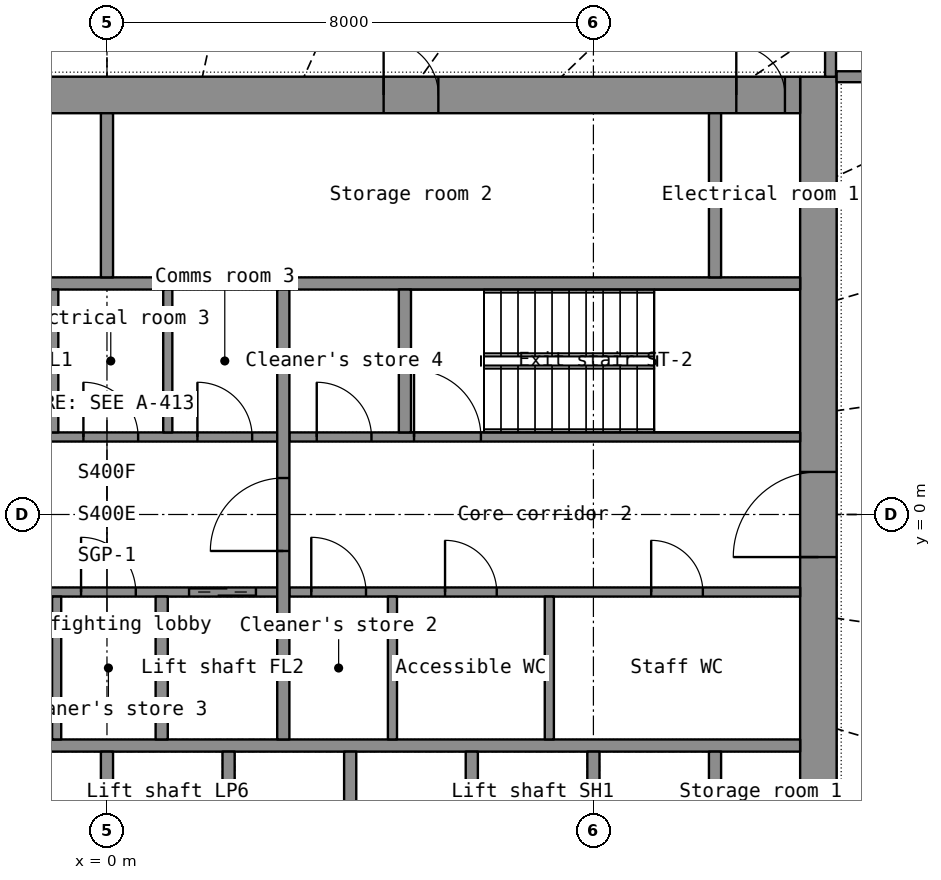
"""IFC4 building model, lengths in metres.
Left out: names, types, materials, properties, quantities, classifications, styles, units other than length and angle.
Written with IfcOpenShell. Run it as: python <this file> out.ifc"""

import sys

from ifc_helpers import new_model, si_unit, direction, frame, frame_2d, origin, place, context, subcontext, project, spatial, rectangle, extrude, element, fill, save


model = new_model("IFC4")
c1 = context("Model", 3, precision=1e-05, world=origin(), true_north=direction((0.0, 1.0)))
c2 = subcontext(c1, "Body", "Model", "MODEL_VIEW")
j1 = project(units=[si_unit("LENGTHUNIT", "METRE"), si_unit("PLANEANGLEUNIT", "RADIAN")], contexts=[c1])
p1 = place(None, origin())
s1 = spatial("IfcSite", under=j1, at=p1, CompositionType="ELEMENT")
p2 = place(p1, origin())
s2 = spatial("IfcBuilding", under=s1, at=p2, CompositionType="ELEMENT")
p3 = place(p2, frame((0.0, 0.0, 85.2)))
s3 = spatial("IfcBuildingStorey", under=s2, at=p3, CompositionType="ELEMENT", Elevation=85.2)
p4 = place(p3, frame((11.7, -7.2, 0.0), z_axis=(0.0, 0.0, 1.0), x_axis=(0.0, 1.0, 0.0)))
e1 = element("IfcWall", 1, at=p4, inside=s3, PredefinedType="SHEAR", context=c2, shape_type="SweptSolid", body=[
    extrude(rectangle(XDim=14.4, YDim=0.6, at=frame_2d((7.2, 0.0))), origin(), (0.0, 0.0, 1.0), 7.0),
])
p5 = place(p4, frame((6.5, 0.0, 0.0)))
e2 = element("IfcOpeningElement", 2, at=p5, cuts=e1, PredefinedType="OPENING", context=c2, shape_type="SweptSolid", body=[
    extrude(rectangle(XDim=1.4, YDim=2.2, at=frame_2d((0.7, 1.1))), frame((0.0, 0.31, 0.0), z_axis=(0.0, -1.0, 0.0), x_axis=(1.0, 0.0, 0.0)), (0.0, 0.0, 1.0), 0.62),
])
p6 = place(p3, frame((-11.4, 6.9, 0.0), z_axis=(0.0, 0.0, 1.0), x_axis=(1.0, 0.0, 0.0)))
e3 = element("IfcWall", 3, at=p6, inside=s3, PredefinedType="SHEAR", context=c2, shape_type="SweptSolid", body=[
    extrude(rectangle(XDim=22.8, YDim=0.6, at=frame_2d((11.4, 0.0))), origin(), (0.0, 0.0, 1.0), 7.0),
])
p7 = place(p6, frame((1.85, 0.0, 0.0)))
e4 = element("IfcOpeningElement", 4, at=p7, cuts=e3, PredefinedType="OPENING", context=c2, shape_type="SweptSolid", body=[
    extrude(rectangle(XDim=1.1, YDim=2.2, at=frame_2d((0.55, 1.1))), frame((0.0, 0.31, 0.0), z_axis=(0.0, -1.0, 0.0), x_axis=(1.0, 0.0, 0.0)), (0.0, 0.0, 1.0), 0.62),
])
p8 = place(p6, frame((7.95, 0.0, 0.0)))
e5 = element("IfcOpeningElement", 5, at=p8, cuts=e3, PredefinedType="OPENING", context=c2, shape_type="SweptSolid", body=[
    extrude(rectangle(XDim=0.9, YDim=2.1, at=frame_2d((0.45, 1.05))), frame((0.0, 0.31, 0.0), z_axis=(0.0, -1.0, 0.0), x_axis=(1.0, 0.0, 0.0)), (0.0, 0.0, 1.0), 0.62),
])
p9 = place(p6, frame((15.95, 0.0, 0.0)))
e6 = element("IfcOpeningElement", 6, at=p9, cuts=e3, PredefinedType="OPENING", context=c2, shape_type="SweptSolid", body=[
    extrude(rectangle(XDim=0.9, YDim=2.1, at=frame_2d((0.45, 1.05))), frame((0.0, 0.31, 0.0), z_axis=(0.0, -1.0, 0.0), x_axis=(1.0, 0.0, 0.0)), (0.0, 0.0, 1.0), 0.62),
])
p10 = place(p6, frame((0.25, 0.0, 0.0)))
e7 = element("IfcOpeningElement", 7, at=p10, cuts=e3, PredefinedType="OPENING", context=c2, shape_type="SweptSolid", body=[
    extrude(rectangle(XDim=0.8, YDim=2.05, at=frame_2d((0.4, 1.025))), frame((0.0, 0.31, 0.0), z_axis=(0.0, -1.0, 0.0), x_axis=(1.0, 0.0, 0.0)), (0.0, 0.0, 1.0), 0.62),
])
p11 = place(p6, frame((21.75, 0.0, 0.0)))
e8 = element("IfcOpeningElement", 8, at=p11, cuts=e3, PredefinedType="OPENING", context=c2, shape_type="SweptSolid", body=[
    extrude(rectangle(XDim=0.8, YDim=2.05, at=frame_2d((0.4, 1.025))), frame((0.0, 0.31, 0.0), z_axis=(0.0, -1.0, 0.0), x_axis=(1.0, 0.0, 0.0)), (0.0, 0.0, 1.0), 0.62),
])
for number, where, z_axis, x_axis in (
    (9, (-11.4, -3.8, 0.0), (0.0, 0.0, 1.0), (1.0, 0.0, 0.0)),
    (10, (-11.4, 3.8, 0.0), (0.0, 0.0, 1.0), (1.0, 0.0, 0.0)),
):
    element("IfcWall", number, at=place(p3, frame(where, z_axis=z_axis, x_axis=x_axis)), inside=s3, PredefinedType="SHEAR", context=c2, shape_type="SweptSolid", body=[
        extrude(rectangle(XDim=22.8, YDim=0.2, at=frame_2d((11.4, 0.0))), origin(), (0.0, 0.0, 1.0), 7.0),
    ])
for number, where, z_axis, x_axis in (
    (11, (0.0, -6.6, 0.0), (0.0, 0.0, 1.0), (0.0, 1.0, 0.0)),
    (12, (2.0, -6.6, 0.0), (0.0, 0.0, 1.0), (0.0, 1.0, 0.0)),
    (13, (4.0, -6.6, 0.0), (0.0, 0.0, 1.0), (0.0, 1.0, 0.0)),
    (14, (6.0, -6.6, 0.0), (0.0, 0.0, 1.0), (0.0, 1.0, 0.0)),
    (15, (8.0, -6.6, 0.0), (0.0, 0.0, 1.0), (0.0, 1.0, 0.0)),
    (16, (10.0, -6.6, 0.0), (0.0, 0.0, 1.0), (0.0, 1.0, 0.0)),
    (17, (10.0, 3.9, 0.0), (0.0, 0.0, 1.0), (0.0, 1.0, 0.0)),
):
    element("IfcWall", number, at=place(p3, frame(where, z_axis=z_axis, x_axis=x_axis)), inside=s3, PredefinedType="SHEAR", context=c2, shape_type="SweptSolid", body=[
        extrude(rectangle(XDim=2.7, YDim=0.2, at=frame_2d((1.35, 0.0))), origin(), (0.0, 0.0, 1.0), 7.0),
    ])
p12 = place(p3, frame((0.0, 3.9, 0.0), z_axis=(0.0, 0.0, 1.0), x_axis=(0.0, 1.0, 0.0)))
e18 = element("IfcWall", 18, at=p12, inside=s3, PredefinedType="PARTITIONING", context=c2, shape_type="SweptSolid", body=[
    extrude(rectangle(XDim=2.7, YDim=0.2, at=frame_2d((1.35, 0.0))), origin(), (0.0, 0.0, 1.0), 7.0),
])
p13 = place(p3, frame((-2.8, -1.275, 0.0), z_axis=(0.0, 0.0, 1.0), x_axis=(1.0, 0.0, 0.0)))
e19 = element("IfcWall", 19, at=p13, inside=s3, PredefinedType="SHEAR", context=c2, shape_type="SweptSolid", body=[
    extrude(rectangle(XDim=5.6, YDim=0.15, at=frame_2d((2.8, 0.0))), origin(), (0.0, 0.0, 1.0), 7.0),
])
p14 = place(p13, frame((4.15, 0.0, 0.0)))
e20 = element("IfcOpeningElement", 20, at=p14, cuts=e19, PredefinedType="OPENING", context=c2, shape_type="SweptSolid", body=[
    extrude(rectangle(XDim=1.1, YDim=2.2, at=frame_2d((0.55, 1.1))), frame((0.0, 0.085, 0.0), z_axis=(0.0, -1.0, 0.0), x_axis=(1.0, 0.0, 0.0)), (0.0, 0.0, 1.0), 0.17),
])
p15 = place(p13, frame((0.499, 0.0, 0.0)))
e21 = element("IfcOpeningElement", 21, at=p15, cuts=e19, PredefinedType="OPENING", context=c2, shape_type="SweptSolid", body=[
    extrude(rectangle(XDim=0.9, YDim=2.1, at=frame_2d((0.45, 1.05))), frame((0.0, 0.085, 0.0), z_axis=(0.0, -1.0, 0.0), x_axis=(1.0, 0.0, 0.0)), (0.0, 0.0, 1.0), 0.17),
])
p16 = place(p13, frame((2.374, 0.0, 0.0)))
e22 = element("IfcOpeningElement", 22, at=p16, cuts=e19, PredefinedType="OPENING", context=c2, shape_type="SweptSolid", body=[
    extrude(rectangle(XDim=0.9, YDim=2.1, at=frame_2d((0.45, 1.05))), frame((0.0, 0.085, 0.0), z_axis=(0.0, -1.0, 0.0), x_axis=(1.0, 0.0, 0.0)), (0.0, 0.0, 1.0), 0.17),
])
p17 = place(p3, frame((3.0, -1.275, 0.0), z_axis=(0.0, 0.0, 1.0), x_axis=(1.0, 0.0, 0.0)))
e23 = element("IfcWall", 23, at=p17, inside=s3, PredefinedType="PARTITIONING", context=c2, shape_type="SweptSolid", body=[
    extrude(rectangle(XDim=8.4, YDim=0.15, at=frame_2d((4.2, 0.0))), origin(), (0.0, 0.0, 1.0), 7.0),
])
p18 = place(p17, frame((0.36, 0.0, 0.0)))
e24 = element("IfcOpeningElement", 24, at=p18, cuts=e23, PredefinedType="OPENING", context=c2, shape_type="SweptSolid", body=[
    extrude(rectangle(XDim=0.9, YDim=2.1, at=frame_2d((0.45, 1.05))), frame((0.0, 0.085, 0.0), z_axis=(0.0, -1.0, 0.0), x_axis=(1.0, 0.0, 0.0)), (0.0, 0.0, 1.0), 0.17),
])
p19 = place(p17, frame((2.56, 0.0, 0.0)))
e25 = element("IfcOpeningElement", 25, at=p19, cuts=e23, PredefinedType="OPENING", context=c2, shape_type="SweptSolid", body=[
    extrude(rectangle(XDim=0.85, YDim=2.1, at=frame_2d((0.425, 1.05))), frame((0.0, 0.085, 0.0), z_axis=(0.0, -1.0, 0.0), x_axis=(1.0, 0.0, 0.0)), (0.0, 0.0, 1.0), 0.17),
])
p20 = place(p17, frame((5.95, 0.0, 0.0)))
e26 = element("IfcOpeningElement", 26, at=p20, cuts=e23, PredefinedType="OPENING", context=c2, shape_type="SweptSolid", body=[
    extrude(rectangle(XDim=0.85, YDim=2.1, at=frame_2d((0.425, 1.05))), frame((0.0, 0.085, 0.0), z_axis=(0.0, -1.0, 0.0), x_axis=(1.0, 0.0, 0.0)), (0.0, 0.0, 1.0), 0.17),
])
p21 = place(p3, frame((-2.8, 1.275, 0.0), z_axis=(0.0, 0.0, 1.0), x_axis=(1.0, 0.0, 0.0)))
e27 = element("IfcWall", 27, at=p21, inside=s3, PredefinedType="SHEAR", context=c2, shape_type="SweptSolid", body=[
    extrude(rectangle(XDim=5.6, YDim=0.15, at=frame_2d((2.8, 0.0))), origin(), (0.0, 0.0, 1.0), 7.0),
])
p22 = place(p21, frame((0.35, 0.0, 0.0)))
e28 = element("IfcOpeningElement", 28, at=p22, cuts=e27, PredefinedType="OPENING", context=c2, shape_type="SweptSolid", body=[
    extrude(rectangle(XDim=1.1, YDim=2.2, at=frame_2d((0.55, 1.1))), frame((0.0, 0.085, 0.0), z_axis=(0.0, -1.0, 0.0), x_axis=(1.0, 0.0, 0.0)), (0.0, 0.0, 1.0), 0.17),
])
p23 = place(p21, frame((2.413, 0.0, 0.0)))
e29 = element("IfcOpeningElement", 29, at=p23, cuts=e27, PredefinedType="OPENING", context=c2, shape_type="SweptSolid", body=[
    extrude(rectangle(XDim=0.9, YDim=2.1, at=frame_2d((0.45, 1.05))), frame((0.0, 0.085, 0.0), z_axis=(0.0, -1.0, 0.0), x_axis=(1.0, 0.0, 0.0)), (0.0, 0.0, 1.0), 0.17),
])
p24 = place(p21, frame((4.288, 0.0, 0.0)))
e30 = element("IfcOpeningElement", 30, at=p24, cuts=e27, PredefinedType="OPENING", context=c2, shape_type="SweptSolid", body=[
    extrude(rectangle(XDim=0.9, YDim=2.1, at=frame_2d((0.45, 1.05))), frame((0.0, 0.085, 0.0), z_axis=(0.0, -1.0, 0.0), x_axis=(1.0, 0.0, 0.0)), (0.0, 0.0, 1.0), 0.17),
])
p25 = place(p3, frame((3.0, 1.275, 0.0), z_axis=(0.0, 0.0, 1.0), x_axis=(1.0, 0.0, 0.0)))
e31 = element("IfcWall", 31, at=p25, inside=s3, PredefinedType="SHEAR", context=c2, shape_type="SweptSolid", body=[
    extrude(rectangle(XDim=8.4, YDim=0.15, at=frame_2d((4.2, 0.0))), origin(), (0.0, 0.0, 1.0), 7.0),
])
p26 = place(p25, frame((2.05, 0.0, 0.0)))
e32 = element("IfcOpeningElement", 32, at=p26, cuts=e31, PredefinedType="OPENING", context=c2, shape_type="SweptSolid", body=[
    extrude(rectangle(XDim=1.1, YDim=2.15, at=frame_2d((0.55, 1.075))), frame((0.0, 0.085, 0.0), z_axis=(0.0, -1.0, 0.0), x_axis=(1.0, 0.0, 0.0)), (0.0, 0.0, 1.0), 0.17),
])
p27 = place(p25, frame((0.45, 0.0, 0.0)))
e33 = element("IfcOpeningElement", 33, at=p27, cuts=e31, PredefinedType="OPENING", context=c2, shape_type="SweptSolid", body=[
    extrude(rectangle(XDim=0.9, YDim=2.1, at=frame_2d((0.45, 1.05))), frame((0.0, 0.085, 0.0), z_axis=(0.0, -1.0, 0.0), x_axis=(1.0, 0.0, 0.0)), (0.0, 0.0, 1.0), 0.17),
])
p28 = place(p3, frame((2.9, -3.7, 0.0), z_axis=(0.0, 0.0, 1.0), x_axis=(0.0, 1.0, 0.0)))
e34 = element("IfcWall", 34, at=p28, inside=s3, PredefinedType="SHEAR", context=c2, shape_type="SweptSolid", body=[
    extrude(rectangle(XDim=7.4, YDim=0.2, at=frame_2d((3.7, 0.0))), origin(), (0.0, 0.0, 1.0), 7.0),
])
p29 = place(p28, frame((3.1, 0.0, 0.0)))
e35 = element("IfcOpeningElement", 35, at=p29, cuts=e34, PredefinedType="OPENING", context=c2, shape_type="SweptSolid", body=[
    extrude(rectangle(XDim=1.2, YDim=2.2, at=frame_2d((0.6, 1.1))), frame((0.0, 0.11, 0.0), z_axis=(0.0, -1.0, 0.0), x_axis=(1.0, 0.0, 0.0)), (0.0, 0.0, 1.0), 0.22),
])
for number, where, z_axis, x_axis in (
    (36, (-0.9, 1.35, 0.0), (0.0, 0.0, 1.0), (0.0, 1.0, 0.0)),
    (37, (0.9, -3.7, 0.0), (0.0, 0.0, 1.0), (0.0, 1.0, 0.0)),
    (38, (4.9, 1.35, 0.0), (0.0, 0.0, 1.0), (0.0, 1.0, 0.0)),
):
    element("IfcWall", number, at=place(p3, frame(where, z_axis=z_axis, x_axis=x_axis)), inside=s3, PredefinedType="SHEAR", context=c2, shape_type="SweptSolid", body=[
        extrude(rectangle(XDim=2.35, YDim=0.2, at=frame_2d((1.175, 0.0))), origin(), (0.0, 0.0, 1.0), 7.0),
    ])
for number, where, z_axis, x_axis in (
    (39, (4.695, -3.7, 0.0), (0.0, 0.0, 1.0), (0.0, 1.0, 0.0)),
    (40, (7.275, -3.7, 0.0), (0.0, 0.0, 1.0), (0.0, 1.0, 0.0)),
    (41, (1.0, 1.35, 0.0), (0.0, 0.0, 1.0), (0.0, 1.0, 0.0)),
    (42, (-0.827, -3.7, 0.0), (0.0, 0.0, 1.0), (0.0, 1.0, 0.0)),
):
    element("IfcWall", number, at=place(p3, frame(where, z_axis=z_axis, x_axis=x_axis)), inside=s3, PredefinedType="PARTITIONING", context=c2, shape_type="SweptSolid", body=[
        extrude(rectangle(XDim=2.35, YDim=0.15, at=frame_2d((1.175, 0.0))), origin(), (0.0, 0.0, 1.0), 7.0),
    ])
p30 = place(p3, frame((11.9, 12.1, 0.0), z_axis=(0.0, 0.0, 1.0), x_axis=(0.0, -1.0, 0.0)))
e43 = element("IfcWall", 43, at=p30, inside=s3, PredefinedType="PARTITIONING", context=c2, shape_type="SweptSolid", body=[
    extrude(rectangle(XDim=4.9, YDim=0.18, at=frame_2d((2.45, 0.0))), origin(), (0.0, 0.0, 1.0), 6.1),
])
p31 = place(p30, frame((1.95, 0.0, 0.0)))
e44 = element("IfcOpeningElement", 44, at=p31, cuts=e43, PredefinedType="OPENING", context=c2, shape_type="SweptSolid", body=[
    extrude(rectangle(XDim=1.0, YDim=2.1, at=frame_2d((0.5, 1.05))), frame((0.0, 0.1, 0.0), z_axis=(0.0, -1.0, 0.0), x_axis=(1.0, 0.0, 0.0)), (0.0, 0.0, 1.0), 0.2),
])
p32 = place(p3, frame((12.0, 7.2, 0.0), z_axis=(0.0, 0.0, 1.0), x_axis=(1.0, 0.0, 0.0)))
e45 = element("IfcWall", 45, at=p32, inside=s3, PredefinedType="PARTITIONING", context=c2, shape_type="SweptSolid", body=[
    extrude(rectangle(XDim=4.9, YDim=0.18, at=frame_2d((2.45, 0.0))), origin(), (0.0, 0.0, 1.0), 6.1),
])
p33 = place(p9, origin())
e46 = element("IfcDoor", 46, at=p33, inside=s3, OperationType="SINGLE_SWING_LEFT", PredefinedType="DOOR", context=c2, shape_type="SweptSolid", body=[
    extrude(rectangle(XDim=0.9, YDim=2.1, at=frame_2d((0.45, 1.05))), frame((0.0, 0.025, 0.0), z_axis=(0.0, -1.0, 0.0), x_axis=(1.0, 0.0, 0.0)), (0.0, 0.0, 1.0), 0.05),
])
fill(e6, e46)
p34 = place(p11, origin())
e47 = element("IfcDoor", 47, at=p34, inside=s3, OperationType="SINGLE_SWING_LEFT", PredefinedType="DOOR", context=c2, shape_type="SweptSolid", body=[
    extrude(rectangle(XDim=0.8, YDim=2.05, at=frame_2d((0.4, 1.025))), frame((0.0, 0.025, 0.0), z_axis=(0.0, -1.0, 0.0), x_axis=(1.0, 0.0, 0.0)), (0.0, 0.0, 1.0), 0.05),
])
fill(e8, e47)
p35 = place(p5, origin())
e48 = element("IfcDoor", 48, at=p35, inside=s3, OperationType="DOUBLE_DOOR_SINGLE_SWING", PredefinedType="DOOR", context=c2, shape_type="SweptSolid", body=[
    extrude(rectangle(XDim=1.4, YDim=2.2, at=frame_2d((0.7, 1.1))), frame((0.0, 0.025, 0.0), z_axis=(0.0, -1.0, 0.0), x_axis=(1.0, 0.0, 0.0)), (0.0, 0.0, 1.0), 0.05),
])
fill(e2, e48)
p36 = place(p29, origin())
e49 = element("IfcDoor", 49, at=p36, inside=s3, OperationType="SINGLE_SWING_LEFT", PredefinedType="DOOR", context=c2, shape_type="SweptSolid", body=[
    extrude(rectangle(XDim=1.2, YDim=2.2, at=frame_2d((0.6, 1.1))), frame((0.0, 0.025, 0.0), z_axis=(0.0, -1.0, 0.0), x_axis=(1.0, 0.0, 0.0)), (0.0, 0.0, 1.0), 0.05),
])
fill(e35, e49)
p37 = place(p14, origin())
e50 = element("IfcDoor", 50, at=p37, inside=s3, OperationType="DOUBLE_DOOR_SLIDING", PredefinedType="DOOR", context=c2, shape_type="SweptSolid", body=[
    extrude(rectangle(XDim=1.1, YDim=2.2, at=frame_2d((0.55, 1.1))), frame((0.0, 0.025, 0.0), z_axis=(0.0, -1.0, 0.0), x_axis=(1.0, 0.0, 0.0)), (0.0, 0.0, 1.0), 0.05),
])
fill(e20, e50)
p38 = place(p26, origin())
e51 = element("IfcDoor", 51, at=p38, inside=s3, OperationType="SINGLE_SWING_LEFT", PredefinedType="DOOR", context=c2, shape_type="SweptSolid", body=[
    extrude(rectangle(XDim=1.1, YDim=2.15, at=frame_2d((0.55, 1.075))), frame((0.0, 0.025, 0.0), z_axis=(0.0, -1.0, 0.0), x_axis=(1.0, 0.0, 0.0)), (0.0, 0.0, 1.0), 0.05),
])
fill(e32, e51)
p39 = place(p18, origin())
e52 = element("IfcDoor", 52, at=p39, inside=s3, OperationType="SINGLE_SWING_LEFT", PredefinedType="DOOR", context=c2, shape_type="SweptSolid", body=[
    extrude(rectangle(XDim=0.9, YDim=2.1, at=frame_2d((0.45, 1.05))), frame((0.0, 0.025, 0.0), z_axis=(0.0, -1.0, 0.0), x_axis=(1.0, 0.0, 0.0)), (0.0, 0.0, 1.0), 0.05),
])
fill(e24, e52)
p40 = place(p19, origin())
e53 = element("IfcDoor", 53, at=p40, inside=s3, OperationType="SINGLE_SWING_LEFT", PredefinedType="DOOR", context=c2, shape_type="SweptSolid", body=[
    extrude(rectangle(XDim=0.85, YDim=2.1, at=frame_2d((0.425, 1.05))), frame((0.0, 0.025, 0.0), z_axis=(0.0, -1.0, 0.0), x_axis=(1.0, 0.0, 0.0)), (0.0, 0.0, 1.0), 0.05),
])
fill(e25, e53)
p41 = place(p20, origin())
e54 = element("IfcDoor", 54, at=p41, inside=s3, OperationType="SINGLE_SWING_LEFT", PredefinedType="DOOR", context=c2, shape_type="SweptSolid", body=[
    extrude(rectangle(XDim=0.85, YDim=2.1, at=frame_2d((0.425, 1.05))), frame((0.0, 0.025, 0.0), z_axis=(0.0, -1.0, 0.0), x_axis=(1.0, 0.0, 0.0)), (0.0, 0.0, 1.0), 0.05),
])
fill(e26, e54)
p42 = place(p23, origin())
e55 = element("IfcDoor", 55, at=p42, inside=s3, OperationType="SINGLE_SWING_LEFT", PredefinedType="DOOR", context=c2, shape_type="SweptSolid", body=[
    extrude(rectangle(XDim=0.9, YDim=2.1, at=frame_2d((0.45, 1.05))), frame((0.0, 0.025, 0.0), z_axis=(0.0, -1.0, 0.0), x_axis=(1.0, 0.0, 0.0)), (0.0, 0.0, 1.0), 0.05),
])
fill(e29, e55)
p43 = place(p24, origin())
e56 = element("IfcDoor", 56, at=p43, inside=s3, OperationType="SINGLE_SWING_LEFT", PredefinedType="DOOR", context=c2, shape_type="SweptSolid", body=[
    extrude(rectangle(XDim=0.9, YDim=2.1, at=frame_2d((0.45, 1.05))), frame((0.0, 0.025, 0.0), z_axis=(0.0, -1.0, 0.0), x_axis=(1.0, 0.0, 0.0)), (0.0, 0.0, 1.0), 0.05),
])
fill(e30, e56)
p44 = place(p16, origin())
e57 = element("IfcDoor", 57, at=p44, inside=s3, OperationType="SINGLE_SWING_LEFT", PredefinedType="DOOR", context=c2, shape_type="SweptSolid", body=[
    extrude(rectangle(XDim=0.9, YDim=2.1, at=frame_2d((0.45, 1.05))), frame((0.0, 0.025, 0.0), z_axis=(0.0, -1.0, 0.0), x_axis=(1.0, 0.0, 0.0)), (0.0, 0.0, 1.0), 0.05),
])
fill(e22, e57)
p45 = place(p27, origin())
e58 = element("IfcDoor", 58, at=p45, inside=s3, OperationType="SINGLE_SWING_LEFT", PredefinedType="DOOR", context=c2, shape_type="SweptSolid", body=[
    extrude(rectangle(XDim=0.9, YDim=2.1, at=frame_2d((0.45, 1.05))), frame((0.0, 0.025, 0.0), z_axis=(0.0, -1.0, 0.0), x_axis=(1.0, 0.0, 0.0)), (0.0, 0.0, 1.0), 0.05),
])
fill(e33, e58)
save(model, sys.argv[1])
